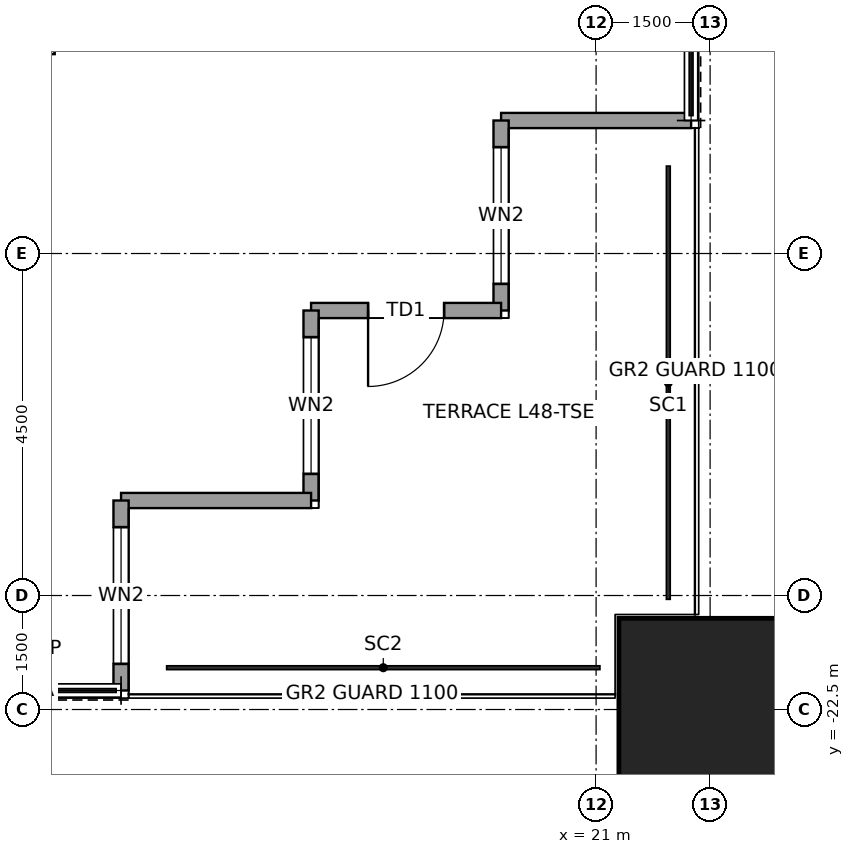
"""IFC4 building model, lengths in metres.
Left out: names, types, materials, properties, quantities, classifications, styles, units other than length and angle.
Written with IfcOpenShell. Run it as: python <this file> out.ifc"""

import sys

from ifc_helpers import new_model, si_unit, direction, frame, frame_2d, origin, origin_2d, place, context, subcontext, project, spatial, rectangle, hollow_rectangle, extrude, element, fill, save


model = new_model("IFC4")
c1 = context("Model", 3, precision=1e-05, world=origin(), true_north=direction((0.0, 1.0)))
c2 = subcontext(c1, "Body", "Model", "MODEL_VIEW")
j1 = project(units=[si_unit("LENGTHUNIT", "METRE"), si_unit("PLANEANGLEUNIT", "RADIAN")], contexts=[c1])
p1 = place(None, origin())
s1 = spatial("IfcSite", under=j1, at=p1, CompositionType="ELEMENT")
p2 = place(p1, origin())
s2 = spatial("IfcBuilding", under=s1, at=p2, CompositionType="ELEMENT")
p3 = place(p2, frame((0.0, 0.0, 225.9)))
s3 = spatial("IfcBuildingStorey", under=s2, at=p3, CompositionType="ELEMENT", Elevation=225.9)
p4 = place(p3, frame((22.5, -22.5, 0.0), z_axis=(0.0, 0.0, 1.0), x_axis=(1.0, 0.0, 0.0)))
e1 = element("IfcColumn", 1, at=p4, inside=s3, PredefinedType="COLUMN", context=c2, shape_type="SweptSolid", body=[
    extrude(hollow_rectangle(XDim=2.4, YDim=2.4, WallThickness=0.12, at=origin_2d()), origin(), (0.0, 0.0, 1.0), 4.0),
])
p5 = place(p3, frame((22.25, -14.75, 0.0), z_axis=(0.0, 0.0, 1.0), x_axis=(-1.0, 0.0, 0.0)))
e2 = element("IfcWall", 2, at=p5, inside=s3, PredefinedType="SOLIDWALL", context=c2, shape_type="SweptSolid", body=[
    extrude(rectangle(XDim=2.5, YDim=0.2, at=frame_2d((1.25, 0.0))), origin(), (0.0, 0.0, 1.0), 3.85),
])
p6 = place(p3, frame((19.75, -14.75, 0.0), z_axis=(0.0, 0.0, 1.0), x_axis=(0.0, -1.0, 0.0)))
e3 = element("IfcWall", 3, at=p6, inside=s3, PredefinedType="SOLIDWALL", context=c2, shape_type="SweptSolid", body=[
    extrude(rectangle(XDim=2.5, YDim=0.2, at=frame_2d((1.25, 0.0))), origin(), (0.0, 0.0, 1.0), 3.85),
])
p7 = place(p6, frame((0.35, 0.0, 0.3)))
e4 = element("IfcOpeningElement", 4, at=p7, cuts=e3, PredefinedType="OPENING", context=c2, shape_type="SweptSolid", body=[
    extrude(rectangle(XDim=1.8, YDim=2.4, at=frame_2d((0.9, 1.2))), frame((0.0, 0.11, 0.0), z_axis=(0.0, -1.0, 0.0), x_axis=(1.0, 0.0, 0.0)), (0.0, 0.0, 1.0), 0.22),
])
p8 = place(p3, frame((19.75, -17.25, 0.0), z_axis=(0.0, 0.0, 1.0), x_axis=(-1.0, 0.0, 0.0)))
e5 = element("IfcWall", 5, at=p8, inside=s3, PredefinedType="SOLIDWALL", context=c2, shape_type="SweptSolid", body=[
    extrude(rectangle(XDim=2.5, YDim=0.2, at=frame_2d((1.25, 0.0))), origin(), (0.0, 0.0, 1.0), 3.85),
])
p9 = place(p8, frame((0.75, 0.0, 0.0)))
e6 = element("IfcOpeningElement", 6, at=p9, cuts=e5, PredefinedType="OPENING", context=c2, shape_type="SweptSolid", body=[
    extrude(rectangle(XDim=1.0, YDim=2.4, at=frame_2d((0.5, 1.2))), frame((0.0, 0.11, 0.0), z_axis=(0.0, -1.0, 0.0), x_axis=(1.0, 0.0, 0.0)), (0.0, 0.0, 1.0), 0.22),
])
p10 = place(p3, frame((17.25, -17.25, 0.0), z_axis=(0.0, 0.0, 1.0), x_axis=(0.0, -1.0, 0.0)))
e7 = element("IfcWall", 7, at=p10, inside=s3, PredefinedType="SOLIDWALL", context=c2, shape_type="SweptSolid", body=[
    extrude(rectangle(XDim=2.5, YDim=0.2, at=frame_2d((1.25, 0.0))), origin(), (0.0, 0.0, 1.0), 3.85),
])
p11 = place(p10, frame((0.35, 0.0, 0.3)))
e8 = element("IfcOpeningElement", 8, at=p11, cuts=e7, PredefinedType="OPENING", context=c2, shape_type="SweptSolid", body=[
    extrude(rectangle(XDim=1.8, YDim=2.4, at=frame_2d((0.9, 1.2))), frame((0.0, 0.11, 0.0), z_axis=(0.0, -1.0, 0.0), x_axis=(1.0, 0.0, 0.0)), (0.0, 0.0, 1.0), 0.22),
])
p12 = place(p3, frame((17.25, -19.75, 0.0), z_axis=(0.0, 0.0, 1.0), x_axis=(-1.0, 0.0, 0.0)))
e9 = element("IfcWall", 9, at=p12, inside=s3, PredefinedType="SOLIDWALL", context=c2, shape_type="SweptSolid", body=[
    extrude(rectangle(XDim=2.5, YDim=0.2, at=frame_2d((1.25, 0.0))), origin(), (0.0, 0.0, 1.0), 3.85),
])
p13 = place(p3, frame((14.75, -19.75, 0.0), z_axis=(0.0, 0.0, 1.0), x_axis=(0.0, -1.0, 0.0)))
e10 = element("IfcWall", 10, at=p13, inside=s3, PredefinedType="SOLIDWALL", context=c2, shape_type="SweptSolid", body=[
    extrude(rectangle(XDim=2.5, YDim=0.2, at=frame_2d((1.25, 0.0))), origin(), (0.0, 0.0, 1.0), 3.85),
])
p14 = place(p13, frame((0.35, 0.0, 0.3)))
e11 = element("IfcOpeningElement", 11, at=p14, cuts=e10, PredefinedType="OPENING", context=c2, shape_type="SweptSolid", body=[
    extrude(rectangle(XDim=1.8, YDim=2.4, at=frame_2d((0.9, 1.2))), frame((0.0, 0.11, 0.0), z_axis=(0.0, -1.0, 0.0), x_axis=(1.0, 0.0, 0.0)), (0.0, 0.0, 1.0), 0.22),
])
p15 = place(p3, frame((-0.075, -13.8, 0.0), z_axis=(0.0, 0.0, 1.0), x_axis=(1.0, 0.0, 0.0)))
e12 = element("IfcWall", 12, at=p15, inside=s3, PredefinedType="PARTITIONING", context=c2, shape_type="SweptSolid", body=[
    extrude(rectangle(XDim=13.95, YDim=0.15, at=frame_2d((6.975, 0.0))), origin(), (0.0, 0.0, 1.0), 3.85),
])
p16 = place(p15, frame((5.475, 0.0, 0.0)))
e13 = element("IfcOpeningElement", 13, at=p16, cuts=e12, PredefinedType="OPENING", context=c2, shape_type="SweptSolid", body=[
    extrude(rectangle(XDim=1.0, YDim=2.4, at=frame_2d((0.5, 1.2))), frame((0.0, 0.085, 0.0), z_axis=(0.0, -1.0, 0.0), x_axis=(1.0, 0.0, 0.0)), (0.0, 0.0, 1.0), 0.17),
])
p17 = place(p3, frame((13.8, -13.875, 0.0), z_axis=(0.0, 0.0, 1.0), x_axis=(0.0, 1.0, 0.0)))
e14 = element("IfcWall", 14, at=p17, inside=s3, PredefinedType="PARTITIONING", context=c2, shape_type="SweptSolid", body=[
    extrude(rectangle(XDim=13.95, YDim=0.15, at=frame_2d((6.975, 0.0))), origin(), (0.0, 0.0, 1.0), 3.85),
])
p18 = place(p7, origin())
e15 = element("IfcWindow", 15, at=p18, inside=s3, PartitioningType="SINGLE_PANEL", PredefinedType="WINDOW", context=c2, shape_type="SweptSolid", body=[
    extrude(rectangle(XDim=1.8, YDim=2.4, at=frame_2d((0.9, 1.2))), frame((0.0, 0.03, 0.0), z_axis=(0.0, -1.0, 0.0), x_axis=(1.0, 0.0, 0.0)), (0.0, 0.0, 1.0), 0.06),
])
fill(e4, e15)
p19 = place(p9, origin())
e16 = element("IfcDoor", 16, at=p19, inside=s3, OperationType="SINGLE_SWING_RIGHT", PredefinedType="DOOR", context=c2, shape_type="SweptSolid", body=[
    extrude(rectangle(XDim=1.0, YDim=2.4, at=frame_2d((0.5, 1.2))), frame((0.0, 0.025, 0.0), z_axis=(0.0, -1.0, 0.0), x_axis=(1.0, 0.0, 0.0)), (0.0, 0.0, 1.0), 0.05),
])
fill(e6, e16)
p20 = place(p11, origin())
e17 = element("IfcWindow", 17, at=p20, inside=s3, PartitioningType="SINGLE_PANEL", PredefinedType="WINDOW", context=c2, shape_type="SweptSolid", body=[
    extrude(rectangle(XDim=1.8, YDim=2.4, at=frame_2d((0.9, 1.2))), frame((0.0, 0.03, 0.0), z_axis=(0.0, -1.0, 0.0), x_axis=(1.0, 0.0, 0.0)), (0.0, 0.0, 1.0), 0.06),
])
fill(e8, e17)
p21 = place(p14, origin())
e18 = element("IfcWindow", 18, at=p21, inside=s3, PartitioningType="SINGLE_PANEL", PredefinedType="WINDOW", context=c2, shape_type="SweptSolid", body=[
    extrude(rectangle(XDim=1.8, YDim=2.4, at=frame_2d((0.9, 1.2))), frame((0.0, 0.03, 0.0), z_axis=(0.0, -1.0, 0.0), x_axis=(1.0, 0.0, 0.0)), (0.0, 0.0, 1.0), 0.06),
])
fill(e11, e18)
save(model, sys.argv[1])
